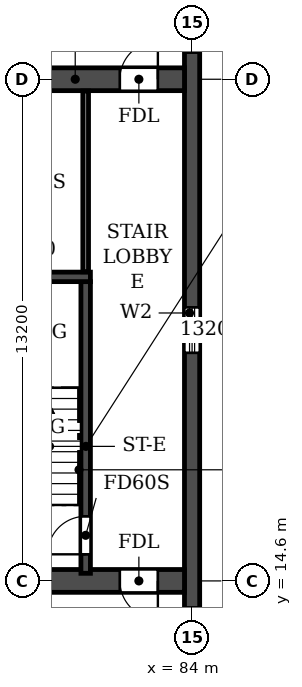
"""IFC4 building model, lengths in metres.
Left out: names, types, materials, properties, quantities, classifications, styles, units other than length and angle.
Written with IfcOpenShell. Run it as: python <this file> out.ifc"""

import sys

from ifc_helpers import new_model, si_unit, direction, frame, frame_2d, origin, place, context, subcontext, project, spatial, rectangle, extrude, element, fill, save


model = new_model("IFC4")
c1 = context("Model", 3, precision=1e-05, world=origin(), true_north=direction((0.0, 1.0)))
c2 = subcontext(c1, "Body", "Model", "MODEL_VIEW")
j1 = project(units=[si_unit("LENGTHUNIT", "METRE"), si_unit("PLANEANGLEUNIT", "RADIAN")], contexts=[c1])
p1 = place(None, origin())
s1 = spatial("IfcSite", under=j1, at=p1, CompositionType="ELEMENT")
p2 = place(p1, origin())
s2 = spatial("IfcBuilding", under=s1, at=p2, CompositionType="ELEMENT")
p3 = place(p2, frame((0.0, 0.0, 214.8)))
s3 = spatial("IfcBuildingStorey", under=s2, at=p3, CompositionType="ELEMENT", Elevation=214.8)
p4 = place(p3, frame((84.0, 4.683, 0.0), z_axis=(0.0, 0.0, 1.0), x_axis=(0.0, 1.0, 0.0)))
e1 = element("IfcWall", 1, at=p4, inside=s3, PredefinedType="SHEAR", context=c2, shape_type="SweptSolid", body=[
    extrude(rectangle(XDim=31.834, YDim=0.4, at=frame_2d((15.917, 0.0))), origin(), (0.0, 0.0, 1.0), 6.38),
])
p5 = place(p4, frame((23.817, 0.0, 0.9)))
e2 = element("IfcOpeningElement", 2, at=p5, cuts=e1, PredefinedType="OPENING", context=c2, shape_type="SweptSolid", body=[
    extrude(rectangle(XDim=1.2, YDim=1.5, at=frame_2d((0.6, 0.75))), frame((0.0, 0.21, 0.0), z_axis=(0.0, -1.0, 0.0), x_axis=(1.0, 0.0, 0.0)), (0.0, 0.0, 1.0), 0.42),
])
p6 = place(p4, frame((8.017, 0.0, 0.9)))
e3 = element("IfcOpeningElement", 3, at=p6, cuts=e1, PredefinedType="OPENING", context=c2, shape_type="SweptSolid", body=[
    extrude(rectangle(XDim=1.2, YDim=1.5, at=frame_2d((0.6, 0.75))), frame((0.0, 0.21, 0.0), z_axis=(0.0, -1.0, 0.0), x_axis=(1.0, 0.0, 0.0)), (0.0, 0.0, 1.0), 0.42),
])
p7 = place(p4, frame((15.917, 0.0, 0.9)))
e4 = element("IfcOpeningElement", 4, at=p7, cuts=e1, PredefinedType="OPENING", context=c2, shape_type="SweptSolid", body=[
    extrude(rectangle(XDim=1.2, YDim=1.5, at=frame_2d((0.6, 0.75))), frame((0.0, 0.21, 0.0), z_axis=(0.0, -1.0, 0.0), x_axis=(1.0, 0.0, 0.0)), (0.0, 0.0, 1.0), 0.42),
])
p8 = place(p3, frame((77.1, 14.6, 0.0), z_axis=(0.0, 0.0, 1.0), x_axis=(1.0, 0.0, 0.0)))
e5 = element("IfcWall", 5, at=p8, inside=s3, PredefinedType="SOLIDWALL", context=c2, shape_type="SweptSolid", body=[
    extrude(rectangle(XDim=6.7, YDim=0.6, at=frame_2d((3.35, 0.0))), origin(), (0.0, 0.0, 1.0), 6.38),
])
p9 = place(p8, frame((5.0, 0.0, 0.0)))
e6 = element("IfcOpeningElement", 6, at=p9, cuts=e5, PredefinedType="OPENING", context=c2, shape_type="SweptSolid", body=[
    extrude(rectangle(XDim=1.0, YDim=2.1, at=frame_2d((0.5, 1.05))), frame((0.0, 0.31, 0.0), z_axis=(0.0, -1.0, 0.0), x_axis=(1.0, 0.0, 0.0)), (0.0, 0.0, 1.0), 0.62),
])
p10 = place(p3, frame((77.1, 27.8, 0.0), z_axis=(0.0, 0.0, 1.0), x_axis=(1.0, 0.0, 0.0)))
e7 = element("IfcWall", 7, at=p10, inside=s3, PredefinedType="SOLIDWALL", context=c2, shape_type="SweptSolid", body=[
    extrude(rectangle(XDim=6.7, YDim=0.6, at=frame_2d((3.35, 0.0))), origin(), (0.0, 0.0, 1.0), 6.38),
])
p11 = place(p10, frame((1.75, 0.0, 0.0)))
e8 = element("IfcOpeningElement", 8, at=p11, cuts=e7, PredefinedType="OPENING", context=c2, shape_type="SweptSolid", body=[
    extrude(rectangle(XDim=0.9, YDim=2.1, at=frame_2d((0.45, 1.05))), frame((0.0, 0.31, 0.0), z_axis=(0.0, -1.0, 0.0), x_axis=(1.0, 0.0, 0.0)), (0.0, 0.0, 1.0), 0.62),
])
p12 = place(p10, frame((5.0, 0.0, 0.0)))
e9 = element("IfcOpeningElement", 9, at=p12, cuts=e7, PredefinedType="OPENING", context=c2, shape_type="SweptSolid", body=[
    extrude(rectangle(XDim=1.0, YDim=2.1, at=frame_2d((0.5, 1.05))), frame((0.0, 0.31, 0.0), z_axis=(0.0, -1.0, 0.0), x_axis=(1.0, 0.0, 0.0)), (0.0, 0.0, 1.0), 0.62),
])
p13 = place(p3, frame((81.2, 14.8, 0.0), z_axis=(0.0, 0.0, 1.0), x_axis=(0.0, 1.0, 0.0)))
e10 = element("IfcWall", 10, at=p13, inside=s3, PredefinedType="SOLIDWALL", context=c2, shape_type="SweptSolid", body=[
    extrude(rectangle(XDim=7.675, YDim=0.25, at=frame_2d((3.837, 0.0))), origin(), (0.0, 0.0, 1.0), 6.38),
])
p14 = place(p13, frame((0.5, 0.0, 0.0)))
e11 = element("IfcOpeningElement", 11, at=p14, cuts=e10, PredefinedType="OPENING", context=c2, shape_type="SweptSolid", body=[
    extrude(rectangle(XDim=1.0, YDim=2.1, at=frame_2d((0.5, 1.05))), frame((0.0, 0.135, 0.0), z_axis=(0.0, -1.0, 0.0), x_axis=(1.0, 0.0, 0.0)), (0.0, 0.0, 1.0), 0.27),
])
p15 = place(p3, frame((77.275, 22.6, 0.0), z_axis=(0.0, 0.0, 1.0), x_axis=(1.0, 0.0, 0.0)))
e12 = element("IfcWall", 12, at=p15, inside=s3, PredefinedType="SOLIDWALL", context=c2, shape_type="SweptSolid", body=[
    extrude(rectangle(XDim=4.05, YDim=0.25, at=frame_2d((2.025, 0.0))), origin(), (0.0, 0.0, 1.0), 6.38),
])
p16 = place(p3, frame((81.2, 22.735, 0.0), z_axis=(0.0, 0.0, 1.0), x_axis=(0.0, 1.0, 0.0)))
e13 = element("IfcWall", 13, at=p16, inside=s3, PredefinedType="PARTITIONING", context=c2, shape_type="SweptSolid", body=[
    extrude(rectangle(XDim=4.755, YDim=0.15, at=frame_2d((2.377, 0.0))), origin(), (0.0, 0.0, 1.0), 6.38),
])
p17 = place(p6, origin())
e14 = element("IfcWindow", 14, at=p17, inside=s3, PartitioningType="SINGLE_PANEL", PredefinedType="WINDOW", context=c2, shape_type="SweptSolid", body=[
    extrude(rectangle(XDim=1.2, YDim=1.5, at=frame_2d((0.6, 0.75))), frame((0.0, 0.03, 0.0), z_axis=(0.0, -1.0, 0.0), x_axis=(1.0, 0.0, 0.0)), (0.0, 0.0, 1.0), 0.06),
])
fill(e3, e14)
p18 = place(p7, origin())
e15 = element("IfcWindow", 15, at=p18, inside=s3, PartitioningType="SINGLE_PANEL", PredefinedType="WINDOW", context=c2, shape_type="SweptSolid", body=[
    extrude(rectangle(XDim=1.2, YDim=1.5, at=frame_2d((0.6, 0.75))), frame((0.0, 0.03, 0.0), z_axis=(0.0, -1.0, 0.0), x_axis=(1.0, 0.0, 0.0)), (0.0, 0.0, 1.0), 0.06),
])
fill(e4, e15)
p19 = place(p12, origin())
e16 = element("IfcDoor", 16, at=p19, inside=s3, OperationType="SINGLE_SWING_RIGHT", PredefinedType="DOOR", context=c2, shape_type="SweptSolid", body=[
    extrude(rectangle(XDim=1.0, YDim=2.1, at=frame_2d((0.5, 1.05))), frame((0.0, 0.025, 0.0), z_axis=(0.0, -1.0, 0.0), x_axis=(1.0, 0.0, 0.0)), (0.0, 0.0, 1.0), 0.05),
])
fill(e9, e16)
p20 = place(p9, frame((1.0, 0.0, 0.0), z_axis=(0.0, 0.0, 1.0), x_axis=(-1.0, 0.0, 0.0)))
e17 = element("IfcDoor", 17, at=p20, inside=s3, OperationType="SINGLE_SWING_LEFT", PredefinedType="DOOR", context=c2, shape_type="SweptSolid", body=[
    extrude(rectangle(XDim=1.0, YDim=2.1, at=frame_2d((0.5, 1.05))), frame((0.0, 0.025, 0.0), z_axis=(0.0, -1.0, 0.0), x_axis=(1.0, 0.0, 0.0)), (0.0, 0.0, 1.0), 0.05),
])
fill(e6, e17)
p21 = place(p14, origin())
e18 = element("IfcDoor", 18, at=p21, inside=s3, OperationType="SINGLE_SWING_LEFT", PredefinedType="DOOR", context=c2, shape_type="SweptSolid", body=[
    extrude(rectangle(XDim=1.0, YDim=2.1, at=frame_2d((0.5, 1.05))), frame((0.0, 0.025, 0.0), z_axis=(0.0, -1.0, 0.0), x_axis=(1.0, 0.0, 0.0)), (0.0, 0.0, 1.0), 0.05),
])
fill(e11, e18)
save(model, sys.argv[1])
